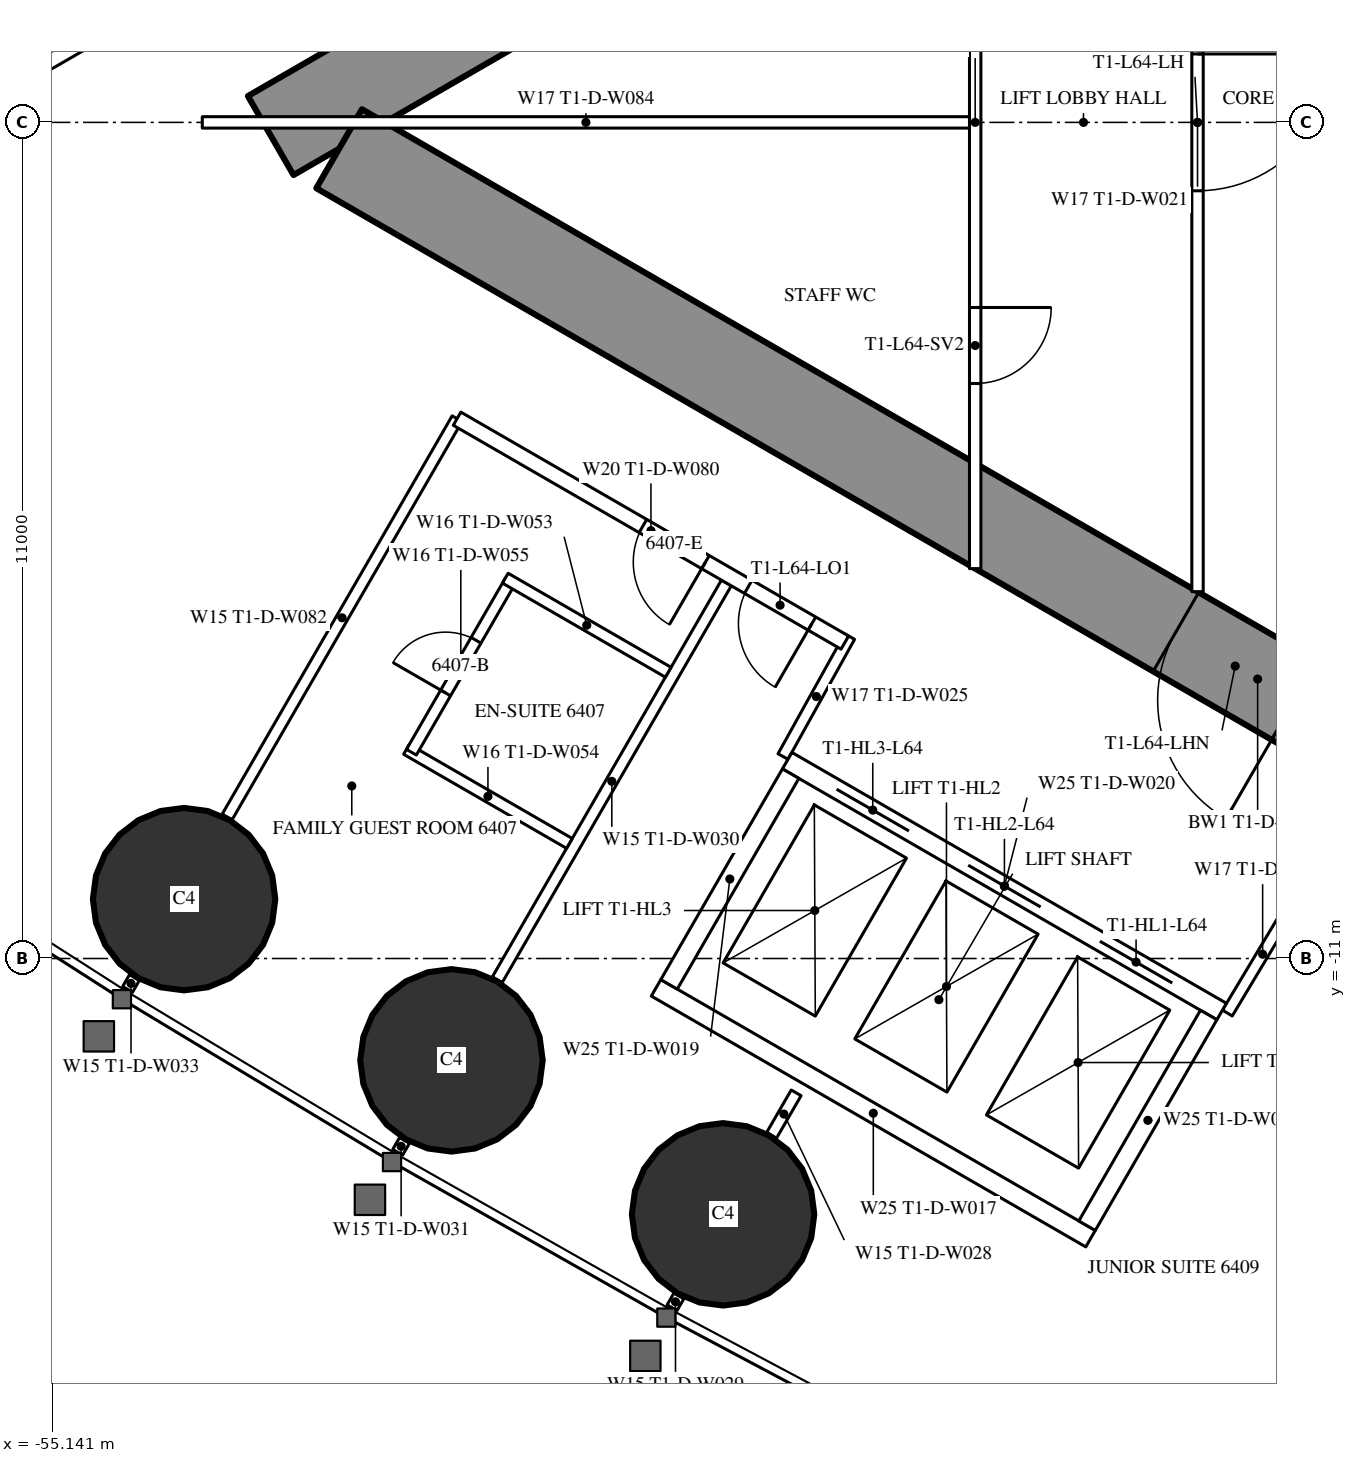
"""IFC4 building model, lengths in metres.
Left out: names, types, materials, properties, quantities, classifications, styles, units other than length and angle.
Written with IfcOpenShell. Run it as: python <this file> out.ifc"""

import sys

from ifc_helpers import new_model, si_unit, direction, frame, frame_2d, origin, origin_2d, place, context, subcontext, project, spatial, rectangle, circle, extrude, element, fill, save


model = new_model("IFC4")
c1 = context("Model", 3, precision=1e-05, world=origin(), true_north=direction((0.0, 1.0)))
c2 = subcontext(c1, "Body", "Model", "MODEL_VIEW")
j1 = project(units=[si_unit("LENGTHUNIT", "METRE"), si_unit("PLANEANGLEUNIT", "RADIAN")], contexts=[c1])
p1 = place(None, origin())
s1 = spatial("IfcSite", under=j1, at=p1, CompositionType="ELEMENT")
p2 = place(p1, origin())
s2 = spatial("IfcBuilding", under=s1, at=p2, CompositionType="ELEMENT")
p3 = place(p2, frame((0.0, 0.0, 240.5)))
s3 = spatial("IfcBuildingStorey", under=s2, at=p3, CompositionType="ELEMENT", Elevation=240.5)
for number, where, z_axis, x_axis in (
    (1, (-53.408, -10.219, 0.0), (0.0, 0.0, 1.0), (1.0, 0.0, 0.0)),
    (2, (-49.89, -12.34, 0.0), (0.0, 0.0, 1.0), (1.0, 0.0, 0.0)),
    (3, (-46.317, -14.365, 0.0), (0.0, 0.0, 1.0), (1.0, 0.0, 0.0)),
):
    element("IfcColumn", number, at=place(p3, frame(where, z_axis=z_axis, x_axis=x_axis)), inside=s3, PredefinedType="COLUMN", context=c2, shape_type="SweptSolid", body=[
        extrude(circle(Radius=1.2, at=origin_2d()), origin(), (0.0, 0.0, 1.0), 3.6),
    ])
p4 = place(p3, frame((-27.2, 14.3, 0.0), z_axis=(0.0, 0.0, 1.0), x_axis=(-0.866026593062, -0.499997940104, 0.0)))
e4 = element("IfcWall", 4, at=p4, inside=s3, PredefinedType="SHEAR", context=c2, shape_type="SweptSolid", body=[
    extrude(rectangle(XDim=28.946, YDim=1.2, at=frame_2d((14.473, 0.0))), origin(), (0.0, 0.0, 1.0), 3.6),
])
p5 = place(p4, frame((4.6, 0.0, 0.0)))
e5 = element("IfcOpeningElement", 5, at=p5, cuts=e4, PredefinedType="OPENING", context=c2, shape_type="SweptSolid", body=[
    extrude(rectangle(XDim=1.0, YDim=2.2, at=frame_2d((0.5, 1.1))), frame((0.0, 0.61, 0.0), z_axis=(0.0, -1.0, 0.0), x_axis=(1.0, 0.0, 0.0)), (0.0, 0.0, 1.0), 1.22),
])
p6 = place(p4, frame((13.395, 0.0, 0.0)))
e6 = element("IfcOpeningElement", 6, at=p6, cuts=e4, PredefinedType="OPENING", context=c2, shape_type="SweptSolid", body=[
    extrude(rectangle(XDim=1.8, YDim=2.2, at=frame_2d((0.9, 1.1))), frame((0.0, 0.61, 0.0), z_axis=(0.0, -1.0, 0.0), x_axis=(1.0, 0.0, 0.0)), (0.0, 0.0, 1.0), 1.22),
])
p7 = place(p3, frame((-27.2, -14.3, 0.0), z_axis=(0.0, 0.0, 1.0), x_axis=(-0.866024021859, 0.500002393557, 0.0)))
e7 = element("IfcWall", 7, at=p7, inside=s3, PredefinedType="SHEAR", context=c2, shape_type="SweptSolid", body=[
    extrude(rectangle(XDim=27.907, YDim=1.2, at=frame_2d((13.954, 0.0))), origin(), (0.0, 0.0, 1.0), 3.6),
])
p8 = place(p7, frame((4.6, 0.0, 0.0)))
e8 = element("IfcOpeningElement", 8, at=p8, cuts=e7, PredefinedType="OPENING", context=c2, shape_type="SweptSolid", body=[
    extrude(rectangle(XDim=1.0, YDim=2.2, at=frame_2d((0.5, 1.1))), frame((0.0, 0.61, 0.0), z_axis=(0.0, -1.0, 0.0), x_axis=(1.0, 0.0, 0.0)), (0.0, 0.0, 1.0), 1.22),
])
p9 = place(p7, frame((13.395, 0.0, 0.0)))
e9 = element("IfcOpeningElement", 9, at=p9, cuts=e7, PredefinedType="OPENING", context=c2, shape_type="SweptSolid", body=[
    extrude(rectangle(XDim=1.8, YDim=2.2, at=frame_2d((0.9, 1.1))), frame((0.0, 0.61, 0.0), z_axis=(0.0, -1.0, 0.0), x_axis=(1.0, 0.0, 0.0)), (0.0, 0.0, 1.0), 1.22),
])
p10 = place(p3, frame((-28.737, 16.068, 0.0), z_axis=(0.0, 0.0, 1.0), x_axis=(-0.866026057212, -0.499998868229, 0.0)))
e10 = element("IfcWall", 10, at=p10, inside=s3, PredefinedType="PARTITIONING", context=c2, shape_type="SweptSolid", body=[
    extrude(rectangle(XDim=32.137, YDim=0.2, at=frame_2d((16.068, 0.0))), origin(), (0.0, 0.0, 1.0), 3.35),
])
p11 = place(p10, frame((1.08, 0.0, 0.0)))
e11 = element("IfcOpeningElement", 11, at=p11, cuts=e10, PredefinedType="OPENING", context=c2, shape_type="SweptSolid", body=[
    extrude(rectangle(XDim=1.8, YDim=2.03, at=frame_2d((0.9, 1.015))), frame((0.0, 0.11, 0.0), z_axis=(0.0, -1.0, 0.0), x_axis=(1.0, 0.0, 0.0)), (0.0, 0.0, 1.0), 0.22),
])
p12 = place(p10, frame((6.86, 0.0, 0.0)))
e12 = element("IfcOpeningElement", 12, at=p12, cuts=e10, PredefinedType="OPENING", context=c2, shape_type="SweptSolid", body=[
    extrude(rectangle(XDim=1.0, YDim=2.2, at=frame_2d((0.5, 1.1))), frame((0.0, 0.11, 0.0), z_axis=(0.0, -1.0, 0.0), x_axis=(1.0, 0.0, 0.0)), (0.0, 0.0, 1.0), 0.22),
])
p13 = place(p10, frame((16.418, 0.0, 0.0)))
e13 = element("IfcOpeningElement", 13, at=p13, cuts=e10, PredefinedType="OPENING", context=c2, shape_type="SweptSolid", body=[
    extrude(rectangle(XDim=0.95, YDim=2.2, at=frame_2d((0.475, 1.1))), frame((0.0, 0.11, 0.0), z_axis=(0.0, -1.0, 0.0), x_axis=(1.0, 0.0, 0.0)), (0.0, 0.0, 1.0), 0.22),
])
p14 = place(p10, frame((20.567, 0.0, 0.0)))
e14 = element("IfcOpeningElement", 14, at=p14, cuts=e10, PredefinedType="OPENING", context=c2, shape_type="SweptSolid", body=[
    extrude(rectangle(XDim=0.95, YDim=2.2, at=frame_2d((0.475, 1.1))), frame((0.0, 0.11, 0.0), z_axis=(0.0, -1.0, 0.0), x_axis=(1.0, 0.0, 0.0)), (0.0, 0.0, 1.0), 0.22),
])
p15 = place(p10, frame((27.065, 0.0, 0.0)))
e15 = element("IfcOpeningElement", 15, at=p15, cuts=e10, PredefinedType="OPENING", context=c2, shape_type="SweptSolid", body=[
    extrude(rectangle(XDim=0.95, YDim=2.2, at=frame_2d((0.475, 1.1))), frame((0.0, 0.11, 0.0), z_axis=(0.0, -1.0, 0.0), x_axis=(1.0, 0.0, 0.0)), (0.0, 0.0, 1.0), 0.22),
])
p16 = place(p3, frame((-46.898, -15.439, 0.0), z_axis=(0.0, 0.0, 1.0), x_axis=(-0.500232303069, -0.865891241997, 0.0)))
e16 = element("IfcWall", 16, at=p16, inside=s3, PredefinedType="PARTITIONING", context=c2, shape_type="SweptSolid", body=[
    extrude(rectangle(XDim=0.18, YDim=0.15, at=frame_2d((0.09, 0.0))), origin(), (0.0, 0.0, 1.0), 2.45),
])
p17 = place(p3, frame((-46.274, -6.059, 0.0), z_axis=(0.0, 0.0, 1.0), x_axis=(-0.500020471368, -0.866013584312, 0.0)))
e17 = element("IfcWall", 17, at=p17, inside=s3, PredefinedType="PARTITIONING", context=c2, shape_type="SweptSolid", body=[
    extrude(rectangle(XDim=6.028, YDim=0.15, at=frame_2d((3.014, 0.0))), origin(), (0.0, 0.0, 1.0), 2.45),
])
p18 = place(p3, frame((-50.508, -13.392, 0.0), z_axis=(0.0, 0.0, 1.0), x_axis=(-0.499644091975, -0.866230789891, 0.0)))
e18 = element("IfcWall", 18, at=p18, inside=s3, PredefinedType="PARTITIONING", context=c2, shape_type="SweptSolid", body=[
    extrude(rectangle(XDim=0.18, YDim=0.15, at=frame_2d((0.09, 0.0))), origin(), (0.0, 0.0, 1.0), 2.45),
])
p19 = place(p3, frame((-49.816, -3.898, 0.0), z_axis=(0.0, 0.0, 1.0), x_axis=(-0.500001913541, -0.866024298998, 0.0)))
e19 = element("IfcWall", 19, at=p19, inside=s3, PredefinedType="PARTITIONING", context=c2, shape_type="SweptSolid", body=[
    extrude(rectangle(XDim=6.05, YDim=0.15, at=frame_2d((3.025, 0.0))), origin(), (0.0, 0.0, 1.0), 2.45),
])
p20 = place(p3, frame((-54.061, -11.25, 0.0), z_axis=(0.0, 0.0, 1.0), x_axis=(-0.500391173478, -0.865799441849, 0.0)))
e20 = element("IfcWall", 20, at=p20, inside=s3, PredefinedType="PARTITIONING", context=c2, shape_type="SweptSolid", body=[
    extrude(rectangle(XDim=0.179, YDim=0.15, at=frame_2d((0.089, 0.0))), origin(), (0.0, 0.0, 1.0), 2.45),
])
p21 = place(p3, frame((-45.356, -12.767, 0.0), z_axis=(0.0, 0.0, 1.0), x_axis=(-0.499886366516, -0.866091000168, 0.0)))
e21 = element("IfcWall", 21, at=p21, inside=s3, PredefinedType="PARTITIONING", context=c2, shape_type="SweptSolid", body=[
    extrude(rectangle(XDim=0.645, YDim=0.15, at=frame_2d((0.322, 0.0))), origin(), (0.0, 0.0, 1.0), 3.35),
])
for number, where, z_axis, x_axis in (
    (22, (-39.683, -11.718, 0.0), (0.0, 0.0, 1.0), (0.514, 0.858, 0.0)),
    (23, (-44.652, -6.764, 0.0), (0.0, 0.0, 1.0), (-0.485, -0.874, 0.0)),
):
    element("IfcWall", number, at=place(p3, frame(where, z_axis=z_axis, x_axis=x_axis)), inside=s3, PredefinedType="PARTITIONING", context=c2, shape_type="SweptSolid", body=[
        extrude(rectangle(XDim=1.805, YDim=0.15, at=frame_2d((0.903, 0.0))), origin(), (0.0, 0.0, 1.0), 3.35),
    ])
p22 = place(p3, frame((-48.339, -9.486, 0.0), z_axis=(0.0, 0.0, 1.0), x_axis=(-0.866006523861, 0.500032699561, 0.0)))
e24 = element("IfcWall", 24, at=p22, inside=s3, PredefinedType="PARTITIONING", context=c2, shape_type="SweptSolid", body=[
    extrude(rectangle(XDim=2.475, YDim=0.15, at=frame_2d((1.237, 0.0))), origin(), (0.0, 0.0, 1.0), 3.35),
])
p23 = place(p3, frame((-49.117, -6.034, 0.0), z_axis=(0.0, 0.0, 1.0), x_axis=(-0.500006934395, -0.866021400173, 0.0)))
e25 = element("IfcWall", 25, at=p23, inside=s3, PredefinedType="PARTITIONING", context=c2, shape_type="SweptSolid", body=[
    extrude(rectangle(XDim=2.6, YDim=0.15, at=frame_2d((1.3, 0.0))), origin(), (0.0, 0.0, 1.0), 3.35),
])
p24 = place(p23, frame((0.9, 0.0, 0.0)))
e26 = element("IfcOpeningElement", 26, at=p24, cuts=e25, PredefinedType="OPENING", context=c2, shape_type="SweptSolid", body=[
    extrude(rectangle(XDim=0.8, YDim=2.2, at=frame_2d((0.4, 1.1))), frame((0.0, 0.085, 0.0), z_axis=(0.0, -1.0, 0.0), x_axis=(1.0, 0.0, 0.0)), (0.0, 0.0, 1.0), 0.17),
])
p25 = place(p3, frame((-47.039, -7.234, 0.0), z_axis=(0.0, 0.0, 1.0), x_axis=(-0.866073894602, 0.499916002032, 0.0)))
e27 = element("IfcWall", 27, at=p25, inside=s3, PredefinedType="PARTITIONING", context=c2, shape_type="SweptSolid", body=[
    extrude(rectangle(XDim=2.475, YDim=0.15, at=frame_2d((1.238, 0.0))), origin(), (0.0, 0.0, 1.0), 2.5),
])
p26 = place(p3, frame((-44.715, -6.844, 0.0), z_axis=(0.0, 0.0, 1.0), x_axis=(-0.866020627653, 0.50000827241, 0.0)))
e28 = element("IfcWall", 28, at=p26, inside=s3, PredefinedType="PARTITIONING", context=c2, shape_type="SweptSolid", body=[
    extrude(rectangle(XDim=5.891, YDim=0.2, at=frame_2d((2.945, 0.0))), origin(), (0.0, 0.0, 1.0), 3.35),
])
p27 = place(p26, frame((2.117, 0.0, 0.0)))
e29 = element("IfcOpeningElement", 29, at=p27, cuts=e28, PredefinedType="OPENING", context=c2, shape_type="SweptSolid", body=[
    extrude(rectangle(XDim=0.95, YDim=2.2, at=frame_2d((0.475, 1.1))), frame((0.0, 0.11, 0.0), z_axis=(0.0, -1.0, 0.0), x_axis=(1.0, 0.0, 0.0)), (0.0, 0.0, 1.0), 0.22),
])
p28 = place(p26, frame((0.5, 0.0, 0.0)))
e30 = element("IfcOpeningElement", 30, at=p28, cuts=e28, PredefinedType="OPENING", context=c2, shape_type="SweptSolid", body=[
    extrude(rectangle(XDim=0.967, YDim=2.2, at=frame_2d((0.483, 1.1))), frame((0.0, 0.11, 0.0), z_axis=(0.0, -1.0, 0.0), x_axis=(1.0, 0.0, 0.0)), (0.0, 0.0, 1.0), 0.22),
])
p29 = place(p3, frame((-40.075, 6.174, 0.0), z_axis=(0.0, 0.0, 1.0), x_axis=(0.0, -1.0, 0.0)))
e31 = element("IfcWall", 31, at=p29, inside=s3, PredefinedType="PARTITIONING", context=c2, shape_type="SweptSolid", body=[
    extrude(rectangle(XDim=12.348, YDim=0.15, at=frame_2d((6.174, 0.0))), origin(), (0.0, 0.0, 1.0), 3.35),
])
p30 = place(p29, frame((5.274, 0.0, 0.0)))
e32 = element("IfcOpeningElement", 32, at=p30, cuts=e31, PredefinedType="OPENING", context=c2, shape_type="SweptSolid", body=[
    extrude(rectangle(XDim=1.8, YDim=2.2, at=frame_2d((0.9, 1.1))), frame((0.0, 0.085, 0.0), z_axis=(0.0, -1.0, 0.0), x_axis=(1.0, 0.0, 0.0)), (0.0, 0.0, 1.0), 0.17),
])
p31 = place(p3, frame((-43.0, 5.871, 0.0), z_axis=(0.0, 0.0, 1.0), x_axis=(0.0, -1.0, 0.0)))
e33 = element("IfcWall", 33, at=p31, inside=s3, PredefinedType="PARTITIONING", context=c2, shape_type="SweptSolid", body=[
    extrude(rectangle(XDim=11.741, YDim=0.15, at=frame_2d((5.871, 0.0))), origin(), (0.0, 0.0, 1.0), 3.35),
])
p32 = place(p31, frame((2.435, 0.0, 0.0)))
e34 = element("IfcOpeningElement", 34, at=p32, cuts=e33, PredefinedType="OPENING", context=c2, shape_type="SweptSolid", body=[
    extrude(rectangle(XDim=1.0, YDim=2.2, at=frame_2d((0.5, 1.1))), frame((0.0, 0.085, 0.0), z_axis=(0.0, -1.0, 0.0), x_axis=(1.0, 0.0, 0.0)), (0.0, 0.0, 1.0), 0.17),
])
p33 = place(p31, frame((8.306, 0.0, 0.0)))
e35 = element("IfcOpeningElement", 35, at=p33, cuts=e33, PredefinedType="OPENING", context=c2, shape_type="SweptSolid", body=[
    extrude(rectangle(XDim=1.0, YDim=2.2, at=frame_2d((0.5, 1.1))), frame((0.0, 0.085, 0.0), z_axis=(0.0, -1.0, 0.0), x_axis=(1.0, 0.0, 0.0)), (0.0, 0.0, 1.0), 0.17),
])
p34 = place(p3, frame((-43.075, 0.0, 0.0), z_axis=(0.0, 0.0, 1.0), x_axis=(-1.0, 0.0, 0.0)))
e36 = element("IfcWall", 36, at=p34, inside=s3, PredefinedType="PARTITIONING", context=c2, shape_type="SweptSolid", body=[
    extrude(rectangle(XDim=10.093, YDim=0.15, at=frame_2d((5.047, 0.0))), origin(), (0.0, 0.0, 1.0), 2.45),
])
p35 = place(p3, frame((-39.758, -11.697, 0.0), z_axis=(0.0, 0.0, 1.0), x_axis=(-0.866024194504, 0.500002094529, 0.0)))
e37 = element("IfcWall", 37, at=p35, inside=s3, PredefinedType="PARTITIONING", context=c2, shape_type="SweptSolid", body=[
    extrude(rectangle(XDim=6.6, YDim=0.25, at=frame_2d((3.3, 0.0))), origin(), (0.0, 0.0, 1.0), 3.35),
])
p36 = place(p35, frame((0.75, 0.0, 0.0)))
e38 = element("IfcOpeningElement", 38, at=p36, cuts=e37, PredefinedType="OPENING", context=c2, shape_type="SweptSolid", body=[
    extrude(rectangle(XDim=1.1, YDim=2.2, at=frame_2d((0.55, 1.1))), frame((0.0, 0.135, 0.0), z_axis=(0.0, -1.0, 0.0), x_axis=(1.0, 0.0, 0.0)), (0.0, 0.0, 1.0), 0.27),
])
p37 = place(p35, frame((2.75, 0.0, 0.0)))
e39 = element("IfcOpeningElement", 39, at=p37, cuts=e37, PredefinedType="OPENING", context=c2, shape_type="SweptSolid", body=[
    extrude(rectangle(XDim=1.1, YDim=2.2, at=frame_2d((0.55, 1.1))), frame((0.0, 0.135, 0.0), z_axis=(0.0, -1.0, 0.0), x_axis=(1.0, 0.0, 0.0)), (0.0, 0.0, 1.0), 0.27),
])
p38 = place(p35, frame((4.75, 0.0, 0.0)))
e40 = element("IfcOpeningElement", 40, at=p38, cuts=e37, PredefinedType="OPENING", context=c2, shape_type="SweptSolid", body=[
    extrude(rectangle(XDim=1.1, YDim=2.2, at=frame_2d((0.55, 1.1))), frame((0.0, 0.135, 0.0), z_axis=(0.0, -1.0, 0.0), x_axis=(1.0, 0.0, 0.0)), (0.0, 0.0, 1.0), 0.27),
])
p39 = place(p3, frame((-41.482, -14.686, 0.0), z_axis=(0.0, 0.0, 1.0), x_axis=(-0.86603344179, 0.499986077507, 0.0)))
e41 = element("IfcWall", 41, at=p39, inside=s3, PredefinedType="PARTITIONING", context=c2, shape_type="SweptSolid", body=[
    extrude(rectangle(XDim=6.6, YDim=0.25, at=frame_2d((3.3, 0.0))), origin(), (0.0, 0.0, 1.0), 3.35),
])
for number, where, z_axis, x_axis in (
    (42, (-39.928, -11.743, 0.0), (0.0, 0.0, 1.0), (-0.5, -0.866, 0.0)),
    (43, (-45.428, -8.568, 0.0), (0.0, 0.0, 1.0), (-0.5, -0.866, 0.0)),
):
    element("IfcWall", number, at=place(p3, frame(where, z_axis=z_axis, x_axis=x_axis)), inside=s3, PredefinedType="PARTITIONING", context=c2, shape_type="SweptSolid", body=[
        extrude(rectangle(XDim=3.201, YDim=0.25, at=frame_2d((1.6, 0.0))), origin(), (0.0, 0.0, 1.0), 3.35),
    ])
p40 = place(p24, origin())
e44 = element("IfcDoor", 44, at=p40, inside=s3, OperationType="SINGLE_SWING_RIGHT", PredefinedType="DOOR", context=c2, shape_type="SweptSolid", body=[
    extrude(rectangle(XDim=0.8, YDim=2.2, at=frame_2d((0.4, 1.1))), frame((0.0, 0.025, 0.0), z_axis=(0.0, -1.0, 0.0), x_axis=(1.0, 0.0, 0.0)), (0.0, 0.0, 1.0), 0.05),
])
fill(e26, e44)
p41 = place(p27, origin())
e45 = element("IfcDoor", 45, at=p41, inside=s3, OperationType="SINGLE_SWING_LEFT", PredefinedType="DOOR", context=c2, shape_type="SweptSolid", body=[
    extrude(rectangle(XDim=0.95, YDim=2.2, at=frame_2d((0.475, 1.1))), frame((0.0, 0.025, 0.0), z_axis=(0.0, -1.0, 0.0), x_axis=(1.0, 0.0, 0.0)), (0.0, 0.0, 1.0), 0.05),
])
fill(e29, e45)
p42 = place(p28, origin())
e46 = element("IfcDoor", 46, at=p42, inside=s3, OperationType="SINGLE_SWING_LEFT", PredefinedType="DOOR", context=c2, shape_type="SweptSolid", body=[
    extrude(rectangle(XDim=0.967, YDim=2.2, at=frame_2d((0.483, 1.1))), frame((0.0, 0.025, 0.0), z_axis=(0.0, -1.0, 0.0), x_axis=(1.0, 0.0, 0.0)), (0.0, 0.0, 1.0), 0.05),
])
fill(e30, e46)
p43 = place(p30, origin())
e47 = element("IfcDoor", 47, at=p43, inside=s3, OperationType="DOUBLE_DOOR_SINGLE_SWING", PredefinedType="DOOR", context=c2, shape_type="SweptSolid", body=[
    extrude(rectangle(XDim=1.8, YDim=2.2, at=frame_2d((0.9, 1.1))), frame((0.0, 0.025, 0.0), z_axis=(0.0, -1.0, 0.0), x_axis=(1.0, 0.0, 0.0)), (0.0, 0.0, 1.0), 0.05),
])
fill(e32, e47)
p44 = place(p33, origin())
e48 = element("IfcDoor", 48, at=p44, inside=s3, OperationType="SINGLE_SWING_LEFT", PredefinedType="DOOR", context=c2, shape_type="SweptSolid", body=[
    extrude(rectangle(XDim=1.0, YDim=2.2, at=frame_2d((0.5, 1.1))), frame((0.0, 0.025, 0.0), z_axis=(0.0, -1.0, 0.0), x_axis=(1.0, 0.0, 0.0)), (0.0, 0.0, 1.0), 0.05),
])
fill(e35, e48)
p45 = place(p9, origin())
e49 = element("IfcDoor", 49, at=p45, inside=s3, OperationType="DOUBLE_DOOR_SINGLE_SWING", PredefinedType="DOOR", context=c2, shape_type="SweptSolid", body=[
    extrude(rectangle(XDim=1.8, YDim=2.2, at=frame_2d((0.9, 1.1))), frame((0.0, 0.025, 0.0), z_axis=(0.0, -1.0, 0.0), x_axis=(1.0, 0.0, 0.0)), (0.0, 0.0, 1.0), 0.05),
])
fill(e9, e49)
p46 = place(p36, origin())
e50 = element("IfcDoor", 50, at=p46, inside=s3, OperationType="DOUBLE_DOOR_SLIDING", PredefinedType="USERDEFINED", context=c2, shape_type="SweptSolid", body=[
    extrude(rectangle(XDim=1.1, YDim=2.2, at=frame_2d((0.55, 1.1))), frame((0.0, 0.025, 0.0), z_axis=(0.0, -1.0, 0.0), x_axis=(1.0, 0.0, 0.0)), (0.0, 0.0, 1.0), 0.05),
])
fill(e38, e50)
p47 = place(p37, origin())
e51 = element("IfcDoor", 51, at=p47, inside=s3, OperationType="DOUBLE_DOOR_SLIDING", PredefinedType="USERDEFINED", context=c2, shape_type="SweptSolid", body=[
    extrude(rectangle(XDim=1.1, YDim=2.2, at=frame_2d((0.55, 1.1))), frame((0.0, 0.025, 0.0), z_axis=(0.0, -1.0, 0.0), x_axis=(1.0, 0.0, 0.0)), (0.0, 0.0, 1.0), 0.05),
])
fill(e39, e51)
p48 = place(p38, origin())
e52 = element("IfcDoor", 52, at=p48, inside=s3, OperationType="DOUBLE_DOOR_SLIDING", PredefinedType="USERDEFINED", context=c2, shape_type="SweptSolid", body=[
    extrude(rectangle(XDim=1.1, YDim=2.2, at=frame_2d((0.55, 1.1))), frame((0.0, 0.025, 0.0), z_axis=(0.0, -1.0, 0.0), x_axis=(1.0, 0.0, 0.0)), (0.0, 0.0, 1.0), 0.05),
])
fill(e40, e52)
save(model, sys.argv[1])
